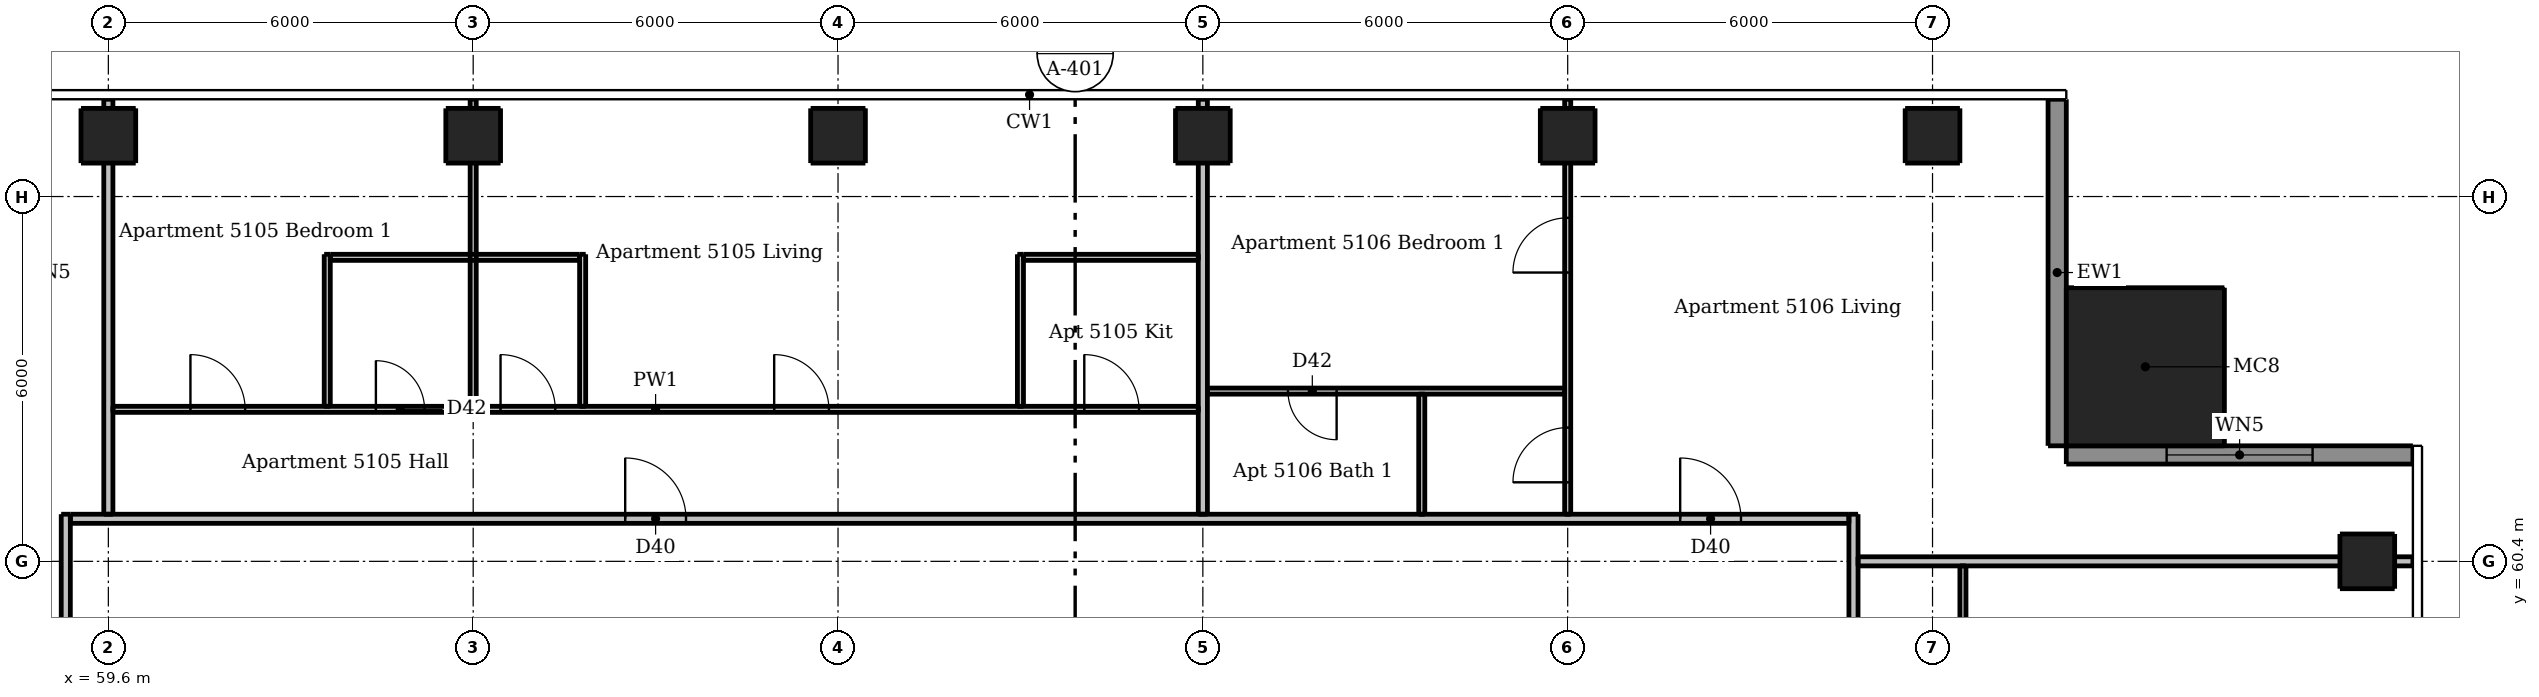
"""IFC4 building model, lengths in metres.
Left out: names, types, materials, properties, quantities, classifications, styles, units other than length and angle.
Written with IfcOpenShell. Run it as: python <this file> out.ifc"""

import sys

from ifc_helpers import new_model, si_unit, direction, frame, frame_2d, origin, origin_2d, place, context, subcontext, project, spatial, rectangle, extrude, element, fill, save


model = new_model("IFC4")
c1 = context("Model", 3, precision=1e-05, world=origin(), true_north=direction((0.0, 1.0)))
c2 = subcontext(c1, "Body", "Model", "MODEL_VIEW")
j1 = project(units=[si_unit("LENGTHUNIT", "METRE"), si_unit("PLANEANGLEUNIT", "RADIAN")], contexts=[c1])
p1 = place(None, origin())
s1 = spatial("IfcSite", under=j1, at=p1, CompositionType="ELEMENT")
p2 = place(p1, origin())
s2 = spatial("IfcBuilding", under=s1, at=p2, CompositionType="ELEMENT")
p3 = place(p2, frame((0.0, 0.0, 193.6)))
s3 = spatial("IfcBuildingStorey", under=s2, at=p3, CompositionType="ELEMENT", Elevation=193.6)
for number, where, z_axis, x_axis in (
    (1, (96.75, 60.4, 0.0), (0.0, 0.0, 1.0), (1.0, 0.0, 0.0)),
    (2, (59.6, 67.4, 0.0), (0.0, 0.0, 1.0), (1.0, 0.0, 0.0)),
    (3, (65.6, 67.4, 0.0), (0.0, 0.0, 1.0), (1.0, 0.0, 0.0)),
    (4, (71.6, 67.4, 0.0), (0.0, 0.0, 1.0), (1.0, 0.0, 0.0)),
    (5, (77.6, 67.4, 0.0), (0.0, 0.0, 1.0), (1.0, 0.0, 0.0)),
    (6, (83.6, 67.4, 0.0), (0.0, 0.0, 1.0), (1.0, 0.0, 0.0)),
    (7, (89.6, 67.4, 0.0), (0.0, 0.0, 1.0), (1.0, 0.0, 0.0)),
):
    element("IfcColumn", number, at=place(p3, frame(where, z_axis=z_axis, x_axis=x_axis)), inside=s3, PredefinedType="COLUMN", context=c2, shape_type="SweptSolid", body=[
        extrude(rectangle(XDim=0.9, YDim=0.9, at=origin_2d()), origin(), (0.0, 0.0, 1.0), 3.05),
    ])
p4 = place(p3, frame((93.1, 63.6, 0.0), z_axis=(0.0, 0.0, 1.0), x_axis=(1.0, 0.0, 0.0)))
e8 = element("IfcColumn", 8, at=p4, inside=s3, PredefinedType="COLUMN", context=c2, shape_type="SweptSolid", body=[
    extrude(rectangle(XDim=2.6, YDim=2.6, at=origin_2d()), origin(), (0.0, 0.0, 1.0), 3.3),
])
p5 = place(p3, frame((97.5, 62.15, 0.0), z_axis=(0.0, 0.0, 1.0), x_axis=(-1.0, 0.0, 0.0)))
e9 = element("IfcWall", 9, at=p5, inside=s3, PredefinedType="SOLIDWALL", context=c2, shape_type="SweptSolid", body=[
    extrude(rectangle(XDim=5.7, YDim=0.3, at=frame_2d((2.85, 0.0))), origin(), (0.0, 0.0, 1.0), 3.05),
])
p6 = place(p5, frame((1.65, 0.0, 0.15)))
e10 = element("IfcOpeningElement", 10, at=p6, cuts=e9, PredefinedType="OPENING", context=c2, shape_type="SweptSolid", body=[
    extrude(rectangle(XDim=2.4, YDim=2.1, at=frame_2d((1.2, 1.05))), frame((0.0, 0.16, 0.0), z_axis=(0.0, -1.0, 0.0), x_axis=(1.0, 0.0, 0.0)), (0.0, 0.0, 1.0), 0.32),
])
p7 = place(p3, frame((91.65, 62.3, 0.0), z_axis=(0.0, 0.0, 1.0), x_axis=(0.0, 1.0, 0.0)))
e11 = element("IfcWall", 11, at=p7, inside=s3, PredefinedType="SOLIDWALL", context=c2, shape_type="SweptSolid", body=[
    extrude(rectangle(XDim=5.7, YDim=0.3, at=frame_2d((2.85, 0.0))), origin(), (0.0, 0.0, 1.0), 3.05),
])
p8 = place(p3, frame((63.2, 62.95, 0.0), z_axis=(0.0, 0.0, 1.0), x_axis=(0.0, 1.0, 0.0)))
e12 = element("IfcWall", 12, at=p8, inside=s3, PredefinedType="PARTITIONING", context=c2, shape_type="SweptSolid", body=[
    extrude(rectangle(XDim=2.5, YDim=0.1, at=frame_2d((1.25, 0.0))), origin(), (0.0, 0.0, 1.0), 3.05),
])
p9 = place(p3, frame((65.6, 62.95, 0.0), z_axis=(0.0, 0.0, 1.0), x_axis=(0.0, 1.0, 0.0)))
e13 = element("IfcWall", 13, at=p9, inside=s3, PredefinedType="PARTITIONING", context=c2, shape_type="SweptSolid", body=[
    extrude(rectangle(XDim=5.05, YDim=0.1, at=frame_2d((2.525, 0.0))), origin(), (0.0, 0.0, 1.0), 2.516),
])
for number, where, z_axis, x_axis in (
    (14, (67.4, 62.95, 0.0), (0.0, 0.0, 1.0), (0.0, 1.0, 0.0)),
    (15, (74.6, 62.95, 0.0), (0.0, 0.0, 1.0), (0.0, 1.0, 0.0)),
):
    element("IfcWall", number, at=place(p3, frame(where, z_axis=z_axis, x_axis=x_axis)), inside=s3, PredefinedType="PARTITIONING", context=c2, shape_type="SweptSolid", body=[
        extrude(rectangle(XDim=2.5, YDim=0.1, at=frame_2d((1.25, 0.0))), origin(), (0.0, 0.0, 1.0), 3.05),
    ])
p10 = place(p3, frame((81.2, 61.175, 0.0), z_axis=(0.0, 0.0, 1.0), x_axis=(0.0, 1.0, 0.0)))
e16 = element("IfcWall", 16, at=p10, inside=s3, PredefinedType="PARTITIONING", context=c2, shape_type="SweptSolid", body=[
    extrude(rectangle(XDim=1.975, YDim=0.1, at=frame_2d((0.987, 0.0))), origin(), (0.0, 0.0, 1.0), 3.05),
])
p11 = place(p3, frame((83.6, 61.175, 0.0), z_axis=(0.0, 0.0, 1.0), x_axis=(0.0, 1.0, 0.0)))
e17 = element("IfcWall", 17, at=p11, inside=s3, PredefinedType="PARTITIONING", context=c2, shape_type="SweptSolid", body=[
    extrude(rectangle(XDim=6.825, YDim=0.1, at=frame_2d((3.413, 0.0))), origin(), (0.0, 0.0, 1.0), 2.516),
])
p12 = place(p11, frame((0.525, 0.0, 0.0)))
e18 = element("IfcOpeningElement", 18, at=p12, cuts=e17, PredefinedType="OPENING", context=c2, shape_type="SweptSolid", body=[
    extrude(rectangle(XDim=0.9, YDim=2.1, at=frame_2d((0.45, 1.05))), frame((0.0, 0.06, 0.0), z_axis=(0.0, -1.0, 0.0), x_axis=(1.0, 0.0, 0.0)), (0.0, 0.0, 1.0), 0.12),
])
p13 = place(p11, frame((3.975, 0.0, 0.0)))
e19 = element("IfcOpeningElement", 19, at=p13, cuts=e17, PredefinedType="OPENING", context=c2, shape_type="SweptSolid", body=[
    extrude(rectangle(XDim=0.9, YDim=2.1, at=frame_2d((0.45, 1.05))), frame((0.0, 0.06, 0.0), z_axis=(0.0, -1.0, 0.0), x_axis=(1.0, 0.0, 0.0)), (0.0, 0.0, 1.0), 0.12),
])
p14 = place(p3, frame((90.1, 60.325, 0.0), z_axis=(0.0, 0.0, 1.0), x_axis=(0.0, -1.0, 0.0)))
e20 = element("IfcWall", 20, at=p14, inside=s3, PredefinedType="PARTITIONING", context=c2, shape_type="SweptSolid", body=[
    extrude(rectangle(XDim=20.75, YDim=0.1, at=frame_2d((10.375, 0.0))), origin(), (0.0, 0.0, 1.0), 3.05),
])
p15 = place(p14, frame((17.425, 0.0, 0.0)))
e21 = element("IfcOpeningElement", 21, at=p15, cuts=e20, PredefinedType="OPENING", context=c2, shape_type="SweptSolid", body=[
    extrude(rectangle(XDim=0.9, YDim=2.1, at=frame_2d((0.45, 1.05))), frame((0.0, 0.06, 0.0), z_axis=(0.0, -1.0, 0.0), x_axis=(1.0, 0.0, 0.0)), (0.0, 0.0, 1.0), 0.12),
])
p16 = place(p14, frame((12.975, 0.0, 0.0)))
e22 = element("IfcOpeningElement", 22, at=p16, cuts=e20, PredefinedType="OPENING", context=c2, shape_type="SweptSolid", body=[
    extrude(rectangle(XDim=0.9, YDim=2.1, at=frame_2d((0.45, 1.05))), frame((0.0, 0.06, 0.0), z_axis=(0.0, -1.0, 0.0), x_axis=(1.0, 0.0, 0.0)), (0.0, 0.0, 1.0), 0.12),
])
p17 = place(p14, frame((7.275, 0.0, 0.0)))
e23 = element("IfcOpeningElement", 23, at=p17, cuts=e20, PredefinedType="OPENING", context=c2, shape_type="SweptSolid", body=[
    extrude(rectangle(XDim=0.9, YDim=2.1, at=frame_2d((0.45, 1.05))), frame((0.0, 0.06, 0.0), z_axis=(0.0, -1.0, 0.0), x_axis=(1.0, 0.0, 0.0)), (0.0, 0.0, 1.0), 0.12),
])
p18 = place(p14, frame((1.275, 0.0, 0.0)))
e24 = element("IfcOpeningElement", 24, at=p18, cuts=e20, PredefinedType="OPENING", context=c2, shape_type="SweptSolid", body=[
    extrude(rectangle(XDim=0.9, YDim=2.1, at=frame_2d((0.45, 1.05))), frame((0.0, 0.06, 0.0), z_axis=(0.0, -1.0, 0.0), x_axis=(1.0, 0.0, 0.0)), (0.0, 0.0, 1.0), 0.12),
])
p19 = place(p14, frame((10.325, 0.0, 0.0)))
e25 = element("IfcOpeningElement", 25, at=p19, cuts=e20, PredefinedType="OPENING", context=c2, shape_type="SweptSolid", body=[
    extrude(rectangle(XDim=0.8, YDim=2.1, at=frame_2d((0.4, 1.05))), frame((0.0, 0.06, 0.0), z_axis=(0.0, -1.0, 0.0), x_axis=(1.0, 0.0, 0.0)), (0.0, 0.0, 1.0), 0.12),
])
p20 = place(p14, frame((4.325, 0.0, 0.0)))
e26 = element("IfcOpeningElement", 26, at=p20, cuts=e20, PredefinedType="OPENING", context=c2, shape_type="SweptSolid", body=[
    extrude(rectangle(XDim=0.8, YDim=2.1, at=frame_2d((0.4, 1.05))), frame((0.0, 0.06, 0.0), z_axis=(0.0, -1.0, 0.0), x_axis=(1.0, 0.0, 0.0)), (0.0, 0.0, 1.0), 0.12),
])
p21 = place(p3, frame((63.25, 65.4, 0.0), z_axis=(0.0, 0.0, 1.0), x_axis=(1.0, 0.0, 0.0)))
e27 = element("IfcWall", 27, at=p21, inside=s3, PredefinedType="PARTITIONING", context=c2, shape_type="SweptSolid", body=[
    extrude(rectangle(XDim=4.1, YDim=0.1, at=frame_2d((2.05, 0.0))), origin(), (0.0, 0.0, 1.0), 3.05),
])
p22 = place(p3, frame((74.65, 65.4, 0.0), z_axis=(0.0, 0.0, 1.0), x_axis=(1.0, 0.0, 0.0)))
e28 = element("IfcWall", 28, at=p22, inside=s3, PredefinedType="PARTITIONING", context=c2, shape_type="SweptSolid", body=[
    extrude(rectangle(XDim=2.875, YDim=0.1, at=frame_2d((1.438, 0.0))), origin(), (0.0, 0.0, 1.0), 3.05),
])
p23 = place(p3, frame((83.55, 63.2, 0.0), z_axis=(0.0, 0.0, 1.0), x_axis=(-1.0, 0.0, 0.0)))
e29 = element("IfcWall", 29, at=p23, inside=s3, PredefinedType="PARTITIONING", context=c2, shape_type="SweptSolid", body=[
    extrude(rectangle(XDim=5.875, YDim=0.1, at=frame_2d((2.938, 0.0))), origin(), (0.0, 0.0, 1.0), 3.05),
])
p24 = place(p23, frame((3.75, 0.0, 0.0)))
e30 = element("IfcOpeningElement", 30, at=p24, cuts=e29, PredefinedType="OPENING", context=c2, shape_type="SweptSolid", body=[
    extrude(rectangle(XDim=0.8, YDim=2.1, at=frame_2d((0.4, 1.05))), frame((0.0, 0.06, 0.0), z_axis=(0.0, -1.0, 0.0), x_axis=(1.0, 0.0, 0.0)), (0.0, 0.0, 1.0), 0.12),
])
p25 = place(p3, frame((59.675, 62.9, 0.0), z_axis=(0.0, 0.0, 1.0), x_axis=(1.0, 0.0, 0.0)))
e31 = element("IfcWall", 31, at=p25, inside=s3, PredefinedType="PARTITIONING", context=c2, shape_type="SweptSolid", body=[
    extrude(rectangle(XDim=17.85, YDim=0.1, at=frame_2d((8.925, 0.0))), origin(), (0.0, 0.0, 1.0), 3.05),
])
p26 = place(p25, frame((10.875, 0.0, 0.0)))
e32 = element("IfcOpeningElement", 32, at=p26, cuts=e31, PredefinedType="OPENING", context=c2, shape_type="SweptSolid", body=[
    extrude(rectangle(XDim=0.9, YDim=2.1, at=frame_2d((0.45, 1.05))), frame((0.0, 0.06, 0.0), z_axis=(0.0, -1.0, 0.0), x_axis=(1.0, 0.0, 0.0)), (0.0, 0.0, 1.0), 0.12),
])
p27 = place(p25, frame((15.975, 0.0, 0.0)))
e33 = element("IfcOpeningElement", 33, at=p27, cuts=e31, PredefinedType="OPENING", context=c2, shape_type="SweptSolid", body=[
    extrude(rectangle(XDim=0.9, YDim=2.1, at=frame_2d((0.45, 1.05))), frame((0.0, 0.06, 0.0), z_axis=(0.0, -1.0, 0.0), x_axis=(1.0, 0.0, 0.0)), (0.0, 0.0, 1.0), 0.12),
])
p28 = place(p25, frame((6.375, 0.0, 0.0)))
e34 = element("IfcOpeningElement", 34, at=p28, cuts=e31, PredefinedType="OPENING", context=c2, shape_type="SweptSolid", body=[
    extrude(rectangle(XDim=0.9, YDim=2.1, at=frame_2d((0.45, 1.05))), frame((0.0, 0.06, 0.0), z_axis=(0.0, -1.0, 0.0), x_axis=(1.0, 0.0, 0.0)), (0.0, 0.0, 1.0), 0.12),
])
p29 = place(p25, frame((1.275, 0.0, 0.0)))
e35 = element("IfcOpeningElement", 35, at=p29, cuts=e31, PredefinedType="OPENING", context=c2, shape_type="SweptSolid", body=[
    extrude(rectangle(XDim=0.9, YDim=2.1, at=frame_2d((0.45, 1.05))), frame((0.0, 0.06, 0.0), z_axis=(0.0, -1.0, 0.0), x_axis=(1.0, 0.0, 0.0)), (0.0, 0.0, 1.0), 0.12),
])
p30 = place(p25, frame((4.325, 0.0, 0.0)))
e36 = element("IfcOpeningElement", 36, at=p30, cuts=e31, PredefinedType="OPENING", context=c2, shape_type="SweptSolid", body=[
    extrude(rectangle(XDim=0.8, YDim=2.1, at=frame_2d((0.4, 1.05))), frame((0.0, 0.06, 0.0), z_axis=(0.0, -1.0, 0.0), x_axis=(1.0, 0.0, 0.0)), (0.0, 0.0, 1.0), 0.12),
])
p31 = place(p3, frame((58.9, 30.325, 0.0), z_axis=(0.0, 0.0, 1.0), x_axis=(0.0, 1.0, 0.0)))
e37 = element("IfcWall", 37, at=p31, inside=s3, PredefinedType="PARTITIONING", context=c2, shape_type="SweptSolid", body=[
    extrude(rectangle(XDim=30.85, YDim=0.15, at=frame_2d((15.425, 0.0))), origin(), (0.0, 0.0, 1.0), 3.05),
])
p32 = place(p31, frame((9.225, 0.0, 0.0)))
e38 = element("IfcOpeningElement", 38, at=p32, cuts=e37, PredefinedType="OPENING", context=c2, shape_type="SweptSolid", body=[
    extrude(rectangle(XDim=1.0, YDim=2.1, at=frame_2d((0.5, 1.05))), frame((0.0, 0.085, 0.0), z_axis=(0.0, -1.0, 0.0), x_axis=(1.0, 0.0, 0.0)), (0.0, 0.0, 1.0), 0.17),
])
p33 = place(p31, frame((26.925, 0.0, 0.0)))
e39 = element("IfcOpeningElement", 39, at=p33, cuts=e37, PredefinedType="OPENING", context=c2, shape_type="SweptSolid", body=[
    extrude(rectangle(XDim=1.0, YDim=2.1, at=frame_2d((0.5, 1.05))), frame((0.0, 0.085, 0.0), z_axis=(0.0, -1.0, 0.0), x_axis=(1.0, 0.0, 0.0)), (0.0, 0.0, 1.0), 0.17),
])
p34 = place(p3, frame((59.6, 61.175, 0.0), z_axis=(0.0, 0.0, 1.0), x_axis=(0.0, 1.0, 0.0)))
e40 = element("IfcWall", 40, at=p34, inside=s3, PredefinedType="PARTITIONING", context=c2, shape_type="SweptSolid", body=[
    extrude(rectangle(XDim=6.825, YDim=0.15, at=frame_2d((3.413, 0.0))), origin(), (0.0, 0.0, 1.0), 2.51),
])
p35 = place(p3, frame((77.6, 61.175, 0.0), z_axis=(0.0, 0.0, 1.0), x_axis=(0.0, 1.0, 0.0)))
e41 = element("IfcWall", 41, at=p35, inside=s3, PredefinedType="PARTITIONING", context=c2, shape_type="SweptSolid", body=[
    extrude(rectangle(XDim=6.825, YDim=0.15, at=frame_2d((3.413, 0.0))), origin(), (0.0, 0.0, 1.0), 2.516),
])
p36 = place(p3, frame((88.3, 61.175, 0.0), z_axis=(0.0, 0.0, 1.0), x_axis=(0.0, -1.0, 0.0)))
e42 = element("IfcWall", 42, at=p36, inside=s3, PredefinedType="PARTITIONING", context=c2, shape_type="SweptSolid", body=[
    extrude(rectangle(XDim=29.4, YDim=0.15, at=frame_2d((14.7, 0.0))), origin(), (0.0, 0.0, 1.0), 3.05),
])
p37 = place(p36, frame((28.125, 0.0, 0.0)))
e43 = element("IfcOpeningElement", 43, at=p37, cuts=e42, PredefinedType="OPENING", context=c2, shape_type="SweptSolid", body=[
    extrude(rectangle(XDim=1.0, YDim=2.1, at=frame_2d((0.5, 1.05))), frame((0.0, 0.085, 0.0), z_axis=(0.0, -1.0, 0.0), x_axis=(1.0, 0.0, 0.0)), (0.0, 0.0, 1.0), 0.17),
])
p38 = place(p36, frame((10.725, 0.0, 0.0)))
e44 = element("IfcOpeningElement", 44, at=p38, cuts=e42, PredefinedType="OPENING", context=c2, shape_type="SweptSolid", body=[
    extrude(rectangle(XDim=1.0, YDim=2.1, at=frame_2d((0.5, 1.05))), frame((0.0, 0.085, 0.0), z_axis=(0.0, -1.0, 0.0), x_axis=(1.0, 0.0, 0.0)), (0.0, 0.0, 1.0), 0.17),
])
p39 = place(p3, frame((58.975, 61.1, 0.0), z_axis=(0.0, 0.0, 1.0), x_axis=(1.0, 0.0, 0.0)))
e45 = element("IfcWall", 45, at=p39, inside=s3, PredefinedType="PARTITIONING", context=c2, shape_type="SweptSolid", body=[
    extrude(rectangle(XDim=29.25, YDim=0.15, at=frame_2d((14.625, 0.0))), origin(), (0.0, 0.0, 1.0), 3.05),
])
p40 = place(p39, frame((9.125, 0.0, 0.0)))
e46 = element("IfcOpeningElement", 46, at=p40, cuts=e45, PredefinedType="OPENING", context=c2, shape_type="SweptSolid", body=[
    extrude(rectangle(XDim=1.0, YDim=2.1, at=frame_2d((0.5, 1.05))), frame((0.0, 0.085, 0.0), z_axis=(0.0, -1.0, 0.0), x_axis=(1.0, 0.0, 0.0)), (0.0, 0.0, 1.0), 0.17),
])
p41 = place(p39, frame((26.475, 0.0, 0.0)))
e47 = element("IfcOpeningElement", 47, at=p41, cuts=e45, PredefinedType="OPENING", context=c2, shape_type="SweptSolid", body=[
    extrude(rectangle(XDim=1.0, YDim=2.1, at=frame_2d((0.5, 1.05))), frame((0.0, 0.085, 0.0), z_axis=(0.0, -1.0, 0.0), x_axis=(1.0, 0.0, 0.0)), (0.0, 0.0, 1.0), 0.17),
])
p42 = place(p3, frame((88.375, 60.4, 0.0), z_axis=(0.0, 0.0, 1.0), x_axis=(1.0, 0.0, 0.0)))
e48 = element("IfcWall", 48, at=p42, inside=s3, PredefinedType="PARTITIONING", context=c2, shape_type="SweptSolid", body=[
    extrude(rectangle(XDim=9.125, YDim=0.15, at=frame_2d((4.562, 0.0))), origin(), (0.0, 0.0, 1.0), 2.59),
])
p43 = place(p6, origin())
e49 = element("IfcWindow", 49, at=p43, inside=s3, PartitioningType="DOUBLE_PANEL_VERTICAL", PredefinedType="WINDOW", context=c2, shape_type="SweptSolid", body=[
    extrude(rectangle(XDim=2.4, YDim=2.1, at=frame_2d((1.2, 1.05))), frame((0.0, 0.03, 0.0), z_axis=(0.0, -1.0, 0.0), x_axis=(1.0, 0.0, 0.0)), (0.0, 0.0, 1.0), 0.06),
])
fill(e10, e49)
p44 = place(p40, origin())
e50 = element("IfcDoor", 50, at=p44, inside=s3, OperationType="SINGLE_SWING_LEFT", PredefinedType="DOOR", context=c2, shape_type="SweptSolid", body=[
    extrude(rectangle(XDim=1.0, YDim=2.1, at=frame_2d((0.5, 1.05))), frame((0.0, 0.025, 0.0), z_axis=(0.0, -1.0, 0.0), x_axis=(1.0, 0.0, 0.0)), (0.0, 0.0, 1.0), 0.05),
])
fill(e46, e50)
p45 = place(p26, origin())
e51 = element("IfcDoor", 51, at=p45, inside=s3, OperationType="SINGLE_SWING_LEFT", PredefinedType="DOOR", context=c2, shape_type="SweptSolid", body=[
    extrude(rectangle(XDim=0.9, YDim=2.1, at=frame_2d((0.45, 1.05))), frame((0.0, 0.025, 0.0), z_axis=(0.0, -1.0, 0.0), x_axis=(1.0, 0.0, 0.0)), (0.0, 0.0, 1.0), 0.05),
])
fill(e32, e51)
p46 = place(p27, origin())
e52 = element("IfcDoor", 52, at=p46, inside=s3, OperationType="SINGLE_SWING_LEFT", PredefinedType="DOOR", context=c2, shape_type="SweptSolid", body=[
    extrude(rectangle(XDim=0.9, YDim=2.1, at=frame_2d((0.45, 1.05))), frame((0.0, 0.025, 0.0), z_axis=(0.0, -1.0, 0.0), x_axis=(1.0, 0.0, 0.0)), (0.0, 0.0, 1.0), 0.05),
])
fill(e33, e52)
p47 = place(p28, origin())
e53 = element("IfcDoor", 53, at=p47, inside=s3, OperationType="SINGLE_SWING_LEFT", PredefinedType="DOOR", context=c2, shape_type="SweptSolid", body=[
    extrude(rectangle(XDim=0.9, YDim=2.1, at=frame_2d((0.45, 1.05))), frame((0.0, 0.025, 0.0), z_axis=(0.0, -1.0, 0.0), x_axis=(1.0, 0.0, 0.0)), (0.0, 0.0, 1.0), 0.05),
])
fill(e34, e53)
p48 = place(p29, origin())
e54 = element("IfcDoor", 54, at=p48, inside=s3, OperationType="SINGLE_SWING_LEFT", PredefinedType="DOOR", context=c2, shape_type="SweptSolid", body=[
    extrude(rectangle(XDim=0.9, YDim=2.1, at=frame_2d((0.45, 1.05))), frame((0.0, 0.025, 0.0), z_axis=(0.0, -1.0, 0.0), x_axis=(1.0, 0.0, 0.0)), (0.0, 0.0, 1.0), 0.05),
])
fill(e35, e54)
p49 = place(p30, origin())
e55 = element("IfcDoor", 55, at=p49, inside=s3, OperationType="SINGLE_SWING_LEFT", PredefinedType="DOOR", context=c2, shape_type="SweptSolid", body=[
    extrude(rectangle(XDim=0.8, YDim=2.1, at=frame_2d((0.4, 1.05))), frame((0.0, 0.025, 0.0), z_axis=(0.0, -1.0, 0.0), x_axis=(1.0, 0.0, 0.0)), (0.0, 0.0, 1.0), 0.05),
])
fill(e36, e55)
p50 = place(p41, origin())
e56 = element("IfcDoor", 56, at=p50, inside=s3, OperationType="SINGLE_SWING_LEFT", PredefinedType="DOOR", context=c2, shape_type="SweptSolid", body=[
    extrude(rectangle(XDim=1.0, YDim=2.1, at=frame_2d((0.5, 1.05))), frame((0.0, 0.025, 0.0), z_axis=(0.0, -1.0, 0.0), x_axis=(1.0, 0.0, 0.0)), (0.0, 0.0, 1.0), 0.05),
])
fill(e47, e56)
p51 = place(p12, origin())
e57 = element("IfcDoor", 57, at=p51, inside=s3, OperationType="SINGLE_SWING_LEFT", PredefinedType="DOOR", context=c2, shape_type="SweptSolid", body=[
    extrude(rectangle(XDim=0.9, YDim=2.1, at=frame_2d((0.45, 1.05))), frame((0.0, 0.025, 0.0), z_axis=(0.0, -1.0, 0.0), x_axis=(1.0, 0.0, 0.0)), (0.0, 0.0, 1.0), 0.05),
])
fill(e18, e57)
p52 = place(p13, origin())
e58 = element("IfcDoor", 58, at=p52, inside=s3, OperationType="SINGLE_SWING_LEFT", PredefinedType="DOOR", context=c2, shape_type="SweptSolid", body=[
    extrude(rectangle(XDim=0.9, YDim=2.1, at=frame_2d((0.45, 1.05))), frame((0.0, 0.025, 0.0), z_axis=(0.0, -1.0, 0.0), x_axis=(1.0, 0.0, 0.0)), (0.0, 0.0, 1.0), 0.05),
])
fill(e19, e58)
p53 = place(p24, origin())
e59 = element("IfcDoor", 59, at=p53, inside=s3, OperationType="SINGLE_SWING_LEFT", PredefinedType="DOOR", context=c2, shape_type="SweptSolid", body=[
    extrude(rectangle(XDim=0.8, YDim=2.1, at=frame_2d((0.4, 1.05))), frame((0.0, 0.025, 0.0), z_axis=(0.0, -1.0, 0.0), x_axis=(1.0, 0.0, 0.0)), (0.0, 0.0, 1.0), 0.05),
])
fill(e30, e59)
save(model, sys.argv[1])
